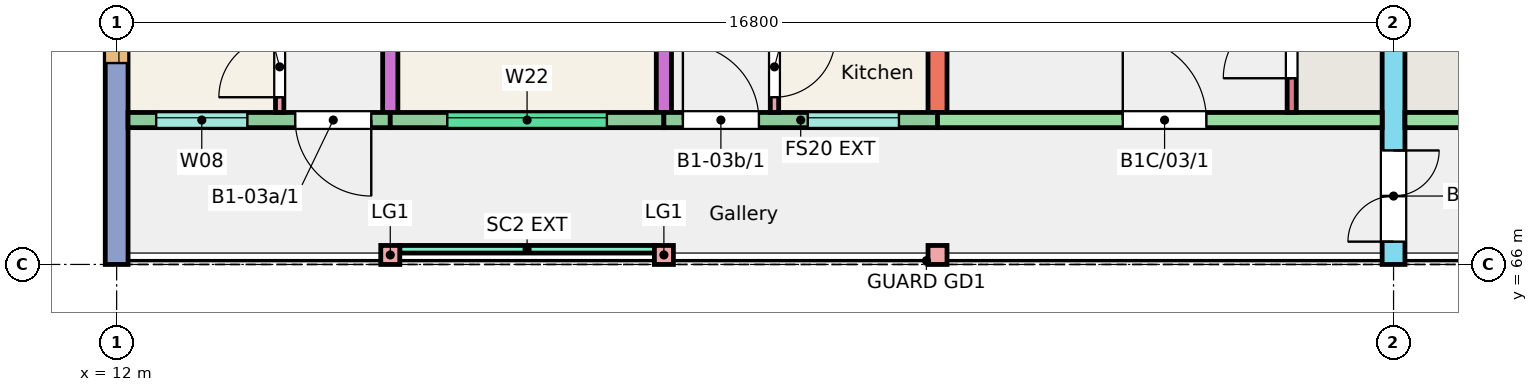
"""IFC4 building model, lengths in metres.
Left out: names, types, materials, properties, quantities, classifications, styles, units other than length and angle.
Written with IfcOpenShell. Run it as: python <this file> out.ifc"""

import sys

from ifc_helpers import new_model, si_unit, direction, frame, frame_2d, origin, origin_2d, place, context, subcontext, project, spatial, rectangle, extrude, element, fill, save


model = new_model("IFC4")
c1 = context("Model", 3, precision=1e-05, world=origin(), true_north=direction((0.0, 1.0)))
c2 = subcontext(c1, "Body", "Model", "MODEL_VIEW")
j1 = project(units=[si_unit("LENGTHUNIT", "METRE"), si_unit("PLANEANGLEUNIT", "RADIAN")], contexts=[c1])
p1 = place(None, origin())
s1 = spatial("IfcSite", under=j1, at=p1, CompositionType="ELEMENT")
p2 = place(p1, origin())
s2 = spatial("IfcBuilding", under=s1, at=p2, CompositionType="ELEMENT")
p3 = place(p2, frame((0.0, 0.0, 9.0)))
s3 = spatial("IfcBuildingStorey", under=s2, at=p3, CompositionType="ELEMENT", Elevation=9.0)
p4 = place(p3, frame((12.0, 66.0, 0.0), z_axis=(0.0, 0.0, 1.0), x_axis=(0.0, 1.0, 0.0)))
e1 = element("IfcWall", 1, at=p4, inside=s3, PredefinedType="SHEAR", context=c2, shape_type="SweptSolid", body=[
    extrude(rectangle(XDim=11.0, YDim=0.3, at=frame_2d((5.5, 0.0))), origin(), (0.0, 0.0, 1.0), 3.0),
])
p5 = place(p4, frame((2.65, 0.0, 0.9)))
e2 = element("IfcOpeningElement", 2, at=p5, cuts=e1, PredefinedType="OPENING", context=c2, shape_type="SweptSolid", body=[
    extrude(rectangle(XDim=1.2, YDim=1.5, at=frame_2d((0.6, 0.75))), frame((0.0, 0.16, 0.0), z_axis=(0.0, -1.0, 0.0), x_axis=(1.0, 0.0, 0.0)), (0.0, 0.0, 1.0), 0.32),
])
p6 = place(p4, frame((8.005, 0.0, 0.9)))
e3 = element("IfcOpeningElement", 3, at=p6, cuts=e1, PredefinedType="OPENING", context=c2, shape_type="SweptSolid", body=[
    extrude(rectangle(XDim=1.8, YDim=1.5, at=frame_2d((0.9, 0.75))), frame((0.0, 0.16, 0.0), z_axis=(0.0, -1.0, 0.0), x_axis=(1.0, 0.0, 0.0)), (0.0, 0.0, 1.0), 0.32),
])
p7 = place(p3, frame((15.6, 68.0, 0.0), z_axis=(0.0, 0.0, 1.0), x_axis=(0.0, 1.0, 0.0)))
e4 = element("IfcWall", 4, at=p7, inside=s3, PredefinedType="SHEAR", context=c2, shape_type="SweptSolid", body=[
    extrude(rectangle(XDim=9.0, YDim=0.2, at=frame_2d((4.5, 0.0))), origin(), (0.0, 0.0, 1.0), 3.0),
])
p8 = place(p7, frame((2.4, 0.0, 0.0)))
e5 = element("IfcOpeningElement", 5, at=p8, cuts=e4, PredefinedType="OPENING", context=c2, shape_type="SweptSolid", body=[
    extrude(rectangle(XDim=1.2, YDim=2.1, at=frame_2d((0.6, 1.05))), frame((0.0, 0.11, 0.0), z_axis=(0.0, -1.0, 0.0), x_axis=(1.0, 0.0, 0.0)), (0.0, 0.0, 1.0), 0.22),
])
p9 = place(p7, frame((6.4, 0.0, 0.0)))
e6 = element("IfcOpeningElement", 6, at=p9, cuts=e4, PredefinedType="OPENING", context=c2, shape_type="SweptSolid", body=[
    extrude(rectangle(XDim=1.2, YDim=2.1, at=frame_2d((0.6, 1.05))), frame((0.0, 0.11, 0.0), z_axis=(0.0, -1.0, 0.0), x_axis=(1.0, 0.0, 0.0)), (0.0, 0.0, 1.0), 0.22),
])
p10 = place(p3, frame((19.2, 68.0, 0.0), z_axis=(0.0, 0.0, 1.0), x_axis=(0.0, 1.0, 0.0)))
e7 = element("IfcWall", 7, at=p10, inside=s3, PredefinedType="SHEAR", context=c2, shape_type="SweptSolid", body=[
    extrude(rectangle(XDim=9.0, YDim=0.2, at=frame_2d((4.5, 0.0))), origin(), (0.0, 0.0, 1.0), 3.0),
])
p11 = place(p3, frame((22.8, 68.0, 0.0), z_axis=(0.0, 0.0, 1.0), x_axis=(0.0, 1.0, 0.0)))
e8 = element("IfcWall", 8, at=p11, inside=s3, PredefinedType="SHEAR", context=c2, shape_type="SweptSolid", body=[
    extrude(rectangle(XDim=9.0, YDim=0.25, at=frame_2d((4.5, 0.0))), origin(), (0.0, 0.0, 1.0), 3.0),
])
p12 = place(p3, frame((28.8, 66.0, 0.0), z_axis=(0.0, 0.0, 1.0), x_axis=(0.0, 1.0, 0.0)))
e9 = element("IfcWall", 9, at=p12, inside=s3, PredefinedType="SHEAR", context=c2, shape_type="SweptSolid", body=[
    extrude(rectangle(XDim=11.0, YDim=0.3, at=frame_2d((5.5, 0.0))), origin(), (0.0, 0.0, 1.0), 3.0),
])
p13 = place(p12, frame((0.3, 0.0, 0.0)))
e10 = element("IfcOpeningElement", 10, at=p13, cuts=e9, PredefinedType="OPENING", context=c2, shape_type="SweptSolid", body=[
    extrude(rectangle(XDim=1.2, YDim=2.1, at=frame_2d((0.6, 1.05))), frame((0.0, 0.16, 0.0), z_axis=(0.0, -1.0, 0.0), x_axis=(1.0, 0.0, 0.0)), (0.0, 0.0, 1.0), 0.32),
])
p14 = place(p3, frame((12.15, 67.9, 0.0), z_axis=(0.0, 0.0, 1.0), x_axis=(1.0, 0.0, 0.0)))
e11 = element("IfcWall", 11, at=p14, inside=s3, PredefinedType="SOLIDWALL", context=c2, shape_type="SweptSolid", body=[
    extrude(rectangle(XDim=3.45, YDim=0.2, at=frame_2d((1.725, 0.0))), origin(), (0.0, 0.0, 1.0), 3.0),
])
p15 = place(p14, frame((0.37, 0.0, 1.1)))
e12 = element("IfcOpeningElement", 12, at=p15, cuts=e11, PredefinedType="OPENING", context=c2, shape_type="SweptSolid", body=[
    extrude(rectangle(XDim=1.2, YDim=1.3, at=frame_2d((0.6, 0.65))), frame((0.0, 0.11, 0.0), z_axis=(0.0, -1.0, 0.0), x_axis=(1.0, 0.0, 0.0)), (0.0, 0.0, 1.0), 0.22),
])
p16 = place(p14, frame((2.2, 0.0, 0.0)))
e13 = element("IfcOpeningElement", 13, at=p16, cuts=e11, PredefinedType="OPENING", context=c2, shape_type="SweptSolid", body=[
    extrude(rectangle(XDim=1.0, YDim=2.1, at=frame_2d((0.5, 1.05))), frame((0.0, 0.11, 0.0), z_axis=(0.0, -1.0, 0.0), x_axis=(1.0, 0.0, 0.0)), (0.0, 0.0, 1.0), 0.22),
])
p17 = place(p3, frame((15.6, 67.9, 0.0), z_axis=(0.0, 0.0, 1.0), x_axis=(1.0, 0.0, 0.0)))
e14 = element("IfcWall", 14, at=p17, inside=s3, PredefinedType="SOLIDWALL", context=c2, shape_type="SweptSolid", body=[
    extrude(rectangle(XDim=3.6, YDim=0.2, at=frame_2d((1.8, 0.0))), origin(), (0.0, 0.0, 1.0), 3.0),
])
p18 = place(p17, frame((0.75, 0.0, 1.2)))
e15 = element("IfcOpeningElement", 15, at=p18, cuts=e14, PredefinedType="OPENING", context=c2, shape_type="SweptSolid", body=[
    extrude(rectangle(XDim=2.1, YDim=1.2, at=frame_2d((1.05, 0.6))), frame((0.0, 0.11, 0.0), z_axis=(0.0, -1.0, 0.0), x_axis=(1.0, 0.0, 0.0)), (0.0, 0.0, 1.0), 0.22),
])
p19 = place(p3, frame((19.2, 67.9, 0.0), z_axis=(0.0, 0.0, 1.0), x_axis=(1.0, 0.0, 0.0)))
e16 = element("IfcWall", 16, at=p19, inside=s3, PredefinedType="SOLIDWALL", context=c2, shape_type="SweptSolid", body=[
    extrude(rectangle(XDim=3.6, YDim=0.2, at=frame_2d((1.8, 0.0))), origin(), (0.0, 0.0, 1.0), 3.0),
])
p20 = place(p19, frame((1.893, 0.0, 1.1)))
e17 = element("IfcOpeningElement", 17, at=p20, cuts=e16, PredefinedType="OPENING", context=c2, shape_type="SweptSolid", body=[
    extrude(rectangle(XDim=1.2, YDim=1.3, at=frame_2d((0.6, 0.65))), frame((0.0, 0.11, 0.0), z_axis=(0.0, -1.0, 0.0), x_axis=(1.0, 0.0, 0.0)), (0.0, 0.0, 1.0), 0.22),
])
p21 = place(p19, frame((0.25, 0.0, 0.0)))
e18 = element("IfcOpeningElement", 18, at=p21, cuts=e16, PredefinedType="OPENING", context=c2, shape_type="SweptSolid", body=[
    extrude(rectangle(XDim=1.0, YDim=2.1, at=frame_2d((0.5, 1.05))), frame((0.0, 0.11, 0.0), z_axis=(0.0, -1.0, 0.0), x_axis=(1.0, 0.0, 0.0)), (0.0, 0.0, 1.0), 0.22),
])
p22 = place(p3, frame((22.8, 67.9, 0.0), z_axis=(0.0, 0.0, 1.0), x_axis=(1.0, 0.0, 0.0)))
e19 = element("IfcWall", 19, at=p22, inside=s3, PredefinedType="SHEAR", context=c2, shape_type="SweptSolid", body=[
    extrude(rectangle(XDim=5.85, YDim=0.2, at=frame_2d((2.925, 0.0))), origin(), (0.0, 0.0, 1.0), 3.0),
])
p23 = place(p22, frame((2.438, 0.0, 0.0)))
e20 = element("IfcOpeningElement", 20, at=p23, cuts=e19, PredefinedType="OPENING", context=c2, shape_type="SweptSolid", body=[
    extrude(rectangle(XDim=1.1, YDim=2.1, at=frame_2d((0.55, 1.05))), frame((0.0, 0.11, 0.0), z_axis=(0.0, -1.0, 0.0), x_axis=(1.0, 0.0, 0.0)), (0.0, 0.0, 1.0), 0.22),
])
p24 = place(p3, frame((27.46, 68.0, 0.0), z_axis=(0.0, 0.0, 1.0), x_axis=(0.0, 1.0, 0.0)))
e21 = element("IfcWall", 21, at=p24, inside=s3, PredefinedType="SHEAR", context=c2, shape_type="SweptSolid", body=[
    extrude(rectangle(XDim=1.72, YDim=0.12, at=frame_2d((0.86, 0.0))), origin(), (0.0, 0.0, 1.0), 3.0),
])
p25 = place(p24, frame((0.45, 0.0, 0.0)))
e22 = element("IfcOpeningElement", 22, at=p25, cuts=e21, PredefinedType="OPENING", context=c2, shape_type="SweptSolid", body=[
    extrude(rectangle(XDim=0.9, YDim=2.1, at=frame_2d((0.45, 1.05))), frame((0.0, 0.07, 0.0), z_axis=(0.0, -1.0, 0.0), x_axis=(1.0, 0.0, 0.0)), (0.0, 0.0, 1.0), 0.14),
])
p26 = place(p3, frame((28.95, 67.9, 0.0), z_axis=(0.0, 0.0, 1.0), x_axis=(1.0, 0.0, 0.0)))
e23 = element("IfcWall", 23, at=p26, inside=s3, PredefinedType="SHEAR", context=c2, shape_type="SweptSolid", body=[
    extrude(rectangle(XDim=5.85, YDim=0.2, at=frame_2d((2.925, 0.0))), origin(), (0.0, 0.0, 1.0), 3.0),
])
p27 = place(p26, frame((2.312, 0.0, 0.0)))
e24 = element("IfcOpeningElement", 24, at=p27, cuts=e23, PredefinedType="OPENING", context=c2, shape_type="SweptSolid", body=[
    extrude(rectangle(XDim=1.1, YDim=2.1, at=frame_2d((0.55, 1.05))), frame((0.0, 0.11, 0.0), z_axis=(0.0, -1.0, 0.0), x_axis=(1.0, 0.0, 0.0)), (0.0, 0.0, 1.0), 0.22),
])
for number, where, z_axis, x_axis in (
    (25, (15.6, 66.125, 0.0), (0.0, 0.0, 1.0), (1.0, 0.0, 0.0)),
    (26, (19.2, 66.125, 0.0), (0.0, 0.0, 1.0), (1.0, 0.0, 0.0)),
    (27, (22.8, 66.125, 0.0), (0.0, 0.0, 1.0), (1.0, 0.0, 0.0)),
):
    element("IfcColumn", number, at=place(p3, frame(where, z_axis=z_axis, x_axis=x_axis)), inside=s3, PredefinedType="COLUMN", context=c2, shape_type="SweptSolid", body=[
        extrude(rectangle(XDim=0.25, YDim=0.25, at=origin_2d()), origin(), (0.0, 0.0, 1.0), 3.0),
    ])
p28 = place(p3, frame((15.725, 66.2, 0.0), z_axis=(0.0, 0.0, 1.0), x_axis=(1.0, 0.0, 0.0)))
e28 = element("IfcWall", 28, at=p28, inside=s3, PredefinedType="SOLIDWALL", context=c2, shape_type="SweptSolid", body=[
    extrude(rectangle(XDim=3.35, YDim=0.1, at=frame_2d((1.675, 0.0))), origin(), (0.0, 0.0, 1.0), 2.45),
])
p29 = place(p3, frame((14.145, 68.0, 0.0), z_axis=(0.0, 0.0, 1.0), x_axis=(0.0, 1.0, 0.0)))
e29 = element("IfcWall", 29, at=p29, inside=s3, PredefinedType="PARTITIONING", context=c2, shape_type="SweptSolid", body=[
    extrude(rectangle(XDim=4.7, YDim=0.11, at=frame_2d((2.35, 0.0))), origin(), (0.0, 0.0, 1.0), 2.8),
])
p30 = place(p29, frame((0.2, 0.0, 0.0)))
e30 = element("IfcOpeningElement", 30, at=p30, cuts=e29, PredefinedType="OPENING", context=c2, shape_type="SweptSolid", body=[
    extrude(rectangle(XDim=0.8, YDim=2.1, at=frame_2d((0.4, 1.05))), frame((0.0, 0.065, 0.0), z_axis=(0.0, -1.0, 0.0), x_axis=(1.0, 0.0, 0.0)), (0.0, 0.0, 1.0), 0.13),
])
p31 = place(p29, frame((3.75, 0.0, 0.0)))
e31 = element("IfcOpeningElement", 31, at=p31, cuts=e29, PredefinedType="OPENING", context=c2, shape_type="SweptSolid", body=[
    extrude(rectangle(XDim=0.8, YDim=2.1, at=frame_2d((0.4, 1.05))), frame((0.0, 0.065, 0.0), z_axis=(0.0, -1.0, 0.0), x_axis=(1.0, 0.0, 0.0)), (0.0, 0.0, 1.0), 0.13),
])
p32 = place(p3, frame((20.655, 68.0, 0.0), z_axis=(0.0, 0.0, 1.0), x_axis=(0.0, 1.0, 0.0)))
e32 = element("IfcWall", 32, at=p32, inside=s3, PredefinedType="PARTITIONING", context=c2, shape_type="SweptSolid", body=[
    extrude(rectangle(XDim=4.5, YDim=0.11, at=frame_2d((2.25, 0.0))), origin(), (0.0, 0.0, 1.0), 2.8),
])
p33 = place(p32, frame((0.2, 0.0, 0.0)))
e33 = element("IfcOpeningElement", 33, at=p33, cuts=e32, PredefinedType="OPENING", context=c2, shape_type="SweptSolid", body=[
    extrude(rectangle(XDim=0.8, YDim=2.1, at=frame_2d((0.4, 1.05))), frame((0.0, 0.065, 0.0), z_axis=(0.0, -1.0, 0.0), x_axis=(1.0, 0.0, 0.0)), (0.0, 0.0, 1.0), 0.13),
])
p34 = place(p32, frame((3.55, 0.0, 0.0)))
e34 = element("IfcOpeningElement", 34, at=p34, cuts=e32, PredefinedType="OPENING", context=c2, shape_type="SweptSolid", body=[
    extrude(rectangle(XDim=0.8, YDim=2.1, at=frame_2d((0.4, 1.05))), frame((0.0, 0.065, 0.0), z_axis=(0.0, -1.0, 0.0), x_axis=(1.0, 0.0, 0.0)), (0.0, 0.0, 1.0), 0.13),
])
p35 = place(p18, origin())
e35 = element("IfcWindow", 35, at=p35, inside=s3, PartitioningType="SINGLE_PANEL", PredefinedType="WINDOW", context=c2, shape_type="SweptSolid", body=[
    extrude(rectangle(XDim=2.1, YDim=1.2, at=frame_2d((1.05, 0.6))), frame((0.0, 0.06, 0.0), z_axis=(0.0, -1.0, 0.0), x_axis=(1.0, 0.0, 0.0)), (0.0, 0.0, 1.0), 0.06),
])
fill(e15, e35)
p36 = place(p15, origin())
e36 = element("IfcWindow", 36, at=p36, inside=s3, PartitioningType="SINGLE_PANEL", PredefinedType="WINDOW", context=c2, shape_type="SweptSolid", body=[
    extrude(rectangle(XDim=1.2, YDim=1.3, at=frame_2d((0.6, 0.65))), frame((0.0, 0.06, 0.0), z_axis=(0.0, -1.0, 0.0), x_axis=(1.0, 0.0, 0.0)), (0.0, 0.0, 1.0), 0.06),
])
fill(e12, e36)
p37 = place(p5, origin())
e37 = element("IfcWindow", 37, at=p37, inside=s3, PartitioningType="SINGLE_PANEL", PredefinedType="WINDOW", context=c2, shape_type="SweptSolid", body=[
    extrude(rectangle(XDim=1.2, YDim=1.5, at=frame_2d((0.6, 0.75))), frame((0.0, 0.0, 0.0), z_axis=(0.0, -1.0, 0.0), x_axis=(1.0, 0.0, 0.0)), (0.0, 0.0, 1.0), 0.06),
])
fill(e2, e37)
p38 = place(p20, origin())
e38 = element("IfcWindow", 38, at=p38, inside=s3, PartitioningType="SINGLE_PANEL", PredefinedType="WINDOW", context=c2, shape_type="SweptSolid", body=[
    extrude(rectangle(XDim=1.2, YDim=1.3, at=frame_2d((0.6, 0.65))), frame((0.0, 0.06, 0.0), z_axis=(0.0, -1.0, 0.0), x_axis=(1.0, 0.0, 0.0)), (0.0, 0.0, 1.0), 0.06),
])
fill(e17, e38)
p39 = place(p16, origin())
e39 = element("IfcDoor", 39, at=p39, inside=s3, OperationType="SINGLE_SWING_RIGHT", PredefinedType="DOOR", context=c2, shape_type="SweptSolid", body=[
    extrude(rectangle(XDim=1.0, YDim=2.1, at=frame_2d((0.5, 1.05))), frame((0.0, 0.025, 0.0), z_axis=(0.0, -1.0, 0.0), x_axis=(1.0, 0.0, 0.0)), (0.0, 0.0, 1.0), 0.05),
])
fill(e13, e39)
p40 = place(p30, origin())
e40 = element("IfcDoor", 40, at=p40, inside=s3, OperationType="SINGLE_SWING_LEFT", PredefinedType="DOOR", context=c2, shape_type="SweptSolid", body=[
    extrude(rectangle(XDim=0.8, YDim=2.1, at=frame_2d((0.4, 1.05))), frame((0.0, 0.025, 0.0), z_axis=(0.0, -1.0, 0.0), x_axis=(1.0, 0.0, 0.0)), (0.0, 0.0, 1.0), 0.05),
])
fill(e30, e40)
p41 = place(p21, origin())
e41 = element("IfcDoor", 41, at=p41, inside=s3, OperationType="SINGLE_SWING_LEFT", PredefinedType="DOOR", context=c2, shape_type="SweptSolid", body=[
    extrude(rectangle(XDim=1.0, YDim=2.1, at=frame_2d((0.5, 1.05))), frame((0.0, 0.025, 0.0), z_axis=(0.0, -1.0, 0.0), x_axis=(1.0, 0.0, 0.0)), (0.0, 0.0, 1.0), 0.05),
])
fill(e18, e41)
p42 = place(p33, origin())
e42 = element("IfcDoor", 42, at=p42, inside=s3, OperationType="SINGLE_SWING_RIGHT", PredefinedType="DOOR", context=c2, shape_type="SweptSolid", body=[
    extrude(rectangle(XDim=0.8, YDim=2.1, at=frame_2d((0.4, 1.05))), frame((0.0, 0.025, 0.0), z_axis=(0.0, -1.0, 0.0), x_axis=(1.0, 0.0, 0.0)), (0.0, 0.0, 1.0), 0.05),
])
fill(e33, e42)
p43 = place(p23, origin())
e43 = element("IfcDoor", 43, at=p43, inside=s3, OperationType="SINGLE_SWING_LEFT", PredefinedType="DOOR", context=c2, shape_type="SweptSolid", body=[
    extrude(rectangle(XDim=1.1, YDim=2.1, at=frame_2d((0.55, 1.05))), frame((0.0, 0.025, 0.0), z_axis=(0.0, -1.0, 0.0), x_axis=(1.0, 0.0, 0.0)), (0.0, 0.0, 1.0), 0.05),
])
fill(e20, e43)
p44 = place(p25, origin())
e44 = element("IfcDoor", 44, at=p44, inside=s3, OperationType="SINGLE_SWING_LEFT", PredefinedType="DOOR", context=c2, shape_type="SweptSolid", body=[
    extrude(rectangle(XDim=0.9, YDim=2.1, at=frame_2d((0.45, 1.05))), frame((0.0, 0.025, 0.0), z_axis=(0.0, -1.0, 0.0), x_axis=(1.0, 0.0, 0.0)), (0.0, 0.0, 1.0), 0.05),
])
fill(e22, e44)
p45 = place(p13, origin())
e45 = element("IfcDoor", 45, at=p45, inside=s3, OperationType="DOUBLE_DOOR_SINGLE_SWING", PredefinedType="DOOR", context=c2, shape_type="SweptSolid", body=[
    extrude(rectangle(XDim=1.2, YDim=2.1, at=frame_2d((0.6, 1.05))), frame((0.0, 0.025, 0.0), z_axis=(0.0, -1.0, 0.0), x_axis=(1.0, 0.0, 0.0)), (0.0, 0.0, 1.0), 0.05),
])
fill(e10, e45)
save(model, sys.argv[1])
